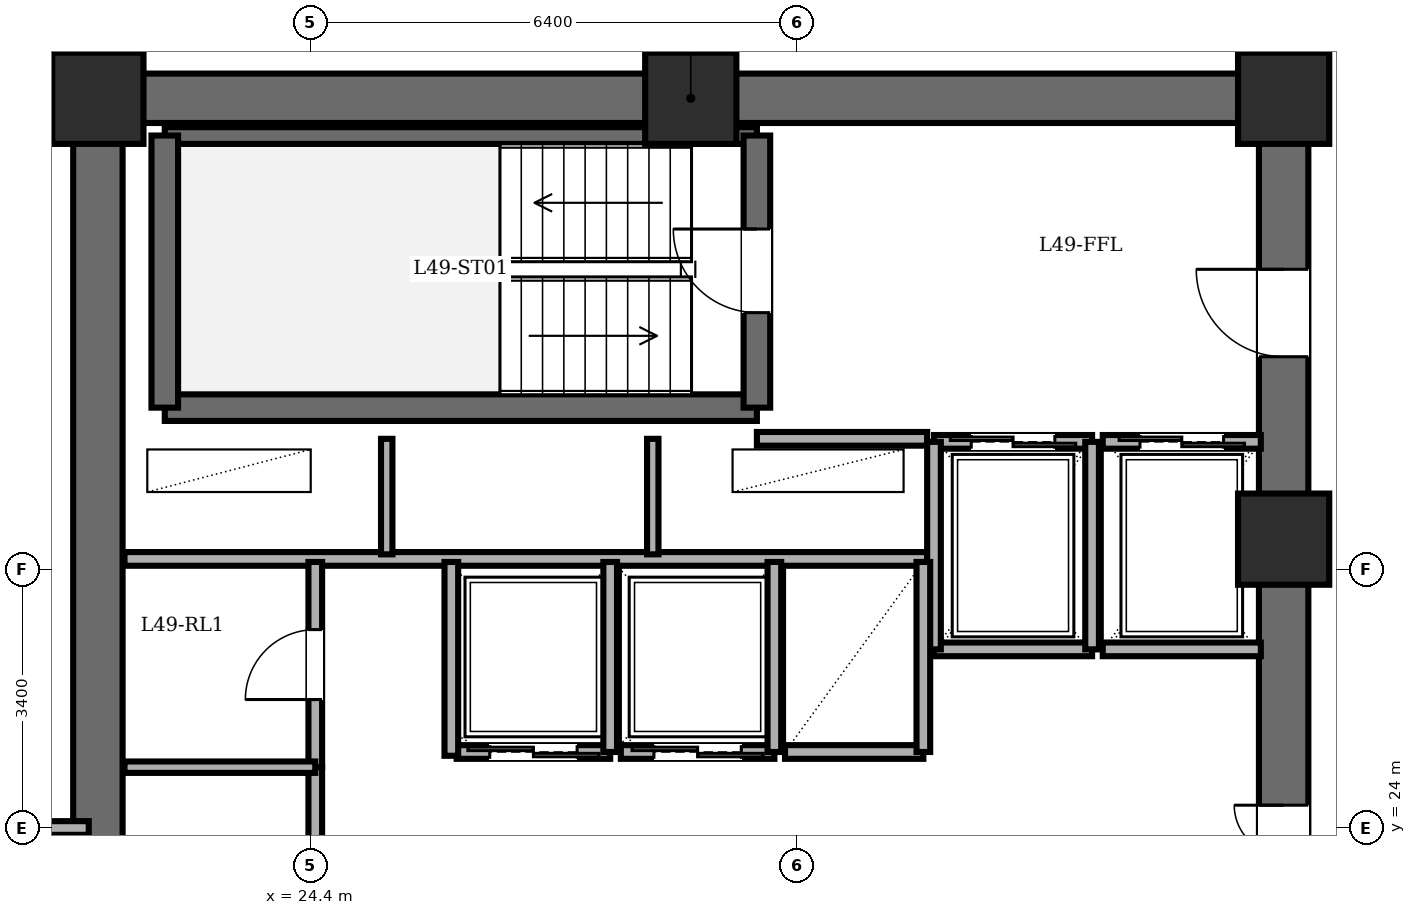
"""IFC4 building model, lengths in metres.
Left out: names, types, materials, properties, quantities, classifications, styles, units other than length and angle.
Written with IfcOpenShell. Run it as: python <this file> out.ifc"""

import sys

from ifc_helpers import new_model, si_unit, direction, frame, frame_2d, origin, origin_2d, place, context, subcontext, project, spatial, rectangle, extrude, element, fill, save


model = new_model("IFC4")
c1 = context("Model", 3, precision=1e-05, world=origin(), true_north=direction((0.0, 1.0)))
c2 = subcontext(c1, "Body", "Model", "MODEL_VIEW")
j1 = project(units=[si_unit("LENGTHUNIT", "METRE"), si_unit("PLANEANGLEUNIT", "RADIAN")], contexts=[c1])
p1 = place(None, origin())
s1 = spatial("IfcSite", under=j1, at=p1, CompositionType="ELEMENT")
p2 = place(p1, origin())
s2 = spatial("IfcBuilding", under=s1, at=p2, CompositionType="ELEMENT")
p3 = place(p2, frame((0.0, 0.0, 187.0)))
s3 = spatial("IfcBuildingStorey", under=s2, at=p3, CompositionType="ELEMENT", Elevation=187.0)
for number, where, z_axis, x_axis in (
    (1, (37.2, 27.8, 0.0), (0.0, 0.0, 1.0), (1.0, 0.0, 0.0)),
    (2, (37.2, 33.6, 0.0), (0.0, 0.0, 1.0), (1.0, 0.0, 0.0)),
    (3, (29.4, 33.6, 0.0), (0.0, 0.0, 1.0), (1.0, 0.0, 0.0)),
    (4, (21.6, 33.6, 0.0), (0.0, 0.0, 1.0), (1.0, 0.0, 0.0)),
):
    element("IfcColumn", number, at=place(p3, frame(where, z_axis=z_axis, x_axis=x_axis)), inside=s3, PredefinedType="COLUMN", context=c2, shape_type="SweptSolid", body=[
        extrude(rectangle(XDim=1.2, YDim=1.2, at=origin_2d()), origin(), (0.0, 0.0, 1.0), 3.6),
    ])
p4 = place(p3, frame((21.6, 14.4, 0.0), z_axis=(0.0, 0.0, 1.0), x_axis=(0.0, 1.0, 0.0)))
e5 = element("IfcWall", 5, at=p4, inside=s3, PredefinedType="SHEAR", context=c2, shape_type="SweptSolid", body=[
    extrude(rectangle(XDim=19.2, YDim=0.65, at=frame_2d((9.6, 0.0))), origin(), (0.0, 0.0, 1.0), 3.36),
])
p5 = place(p3, frame((21.6, 33.6, 0.0), z_axis=(0.0, 0.0, 1.0), x_axis=(1.0, 0.0, 0.0)))
e6 = element("IfcWall", 6, at=p5, inside=s3, PredefinedType="SHEAR", context=c2, shape_type="SweptSolid", body=[
    extrude(rectangle(XDim=15.6, YDim=0.65, at=frame_2d((7.8, 0.0))), origin(), (0.0, 0.0, 1.0), 3.36),
])
p6 = place(p3, frame((37.2, 14.4, 0.0), z_axis=(0.0, 0.0, 1.0), x_axis=(0.0, 1.0, 0.0)))
e7 = element("IfcWall", 7, at=p6, inside=s3, PredefinedType="SHEAR", context=c2, shape_type="SweptSolid", body=[
    extrude(rectangle(XDim=19.2, YDim=0.65, at=frame_2d((9.6, 0.0))), origin(), (0.0, 0.0, 1.0), 3.36),
])
p7 = place(p6, frame((15.8, 0.0, 0.0)))
e8 = element("IfcOpeningElement", 8, at=p7, cuts=e7, PredefinedType="OPENING", context=c2, shape_type="SweptSolid", body=[
    extrude(rectangle(XDim=1.15, YDim=2.15, at=frame_2d((0.575, 1.075))), frame((0.0, 0.335, 0.0), z_axis=(0.0, -1.0, 0.0), x_axis=(1.0, 0.0, 0.0)), (0.0, 0.0, 1.0), 0.67),
])
p8 = place(p6, frame((3.6, 0.0, 0.0)))
e9 = element("IfcOpeningElement", 9, at=p8, cuts=e7, PredefinedType="OPENING", context=c2, shape_type="SweptSolid", body=[
    extrude(rectangle(XDim=1.1, YDim=2.15, at=frame_2d((0.55, 1.075))), frame((0.0, 0.335, 0.0), z_axis=(0.0, -1.0, 0.0), x_axis=(1.0, 0.0, 0.0)), (0.0, 0.0, 1.0), 0.67),
])
p9 = place(p6, frame((8.6, 0.0, 0.0)))
e10 = element("IfcOpeningElement", 10, at=p9, cuts=e7, PredefinedType="OPENING", context=c2, shape_type="SweptSolid", body=[
    extrude(rectangle(XDim=1.3, YDim=2.2, at=frame_2d((0.65, 1.1))), frame((0.0, 0.335, 0.0), z_axis=(0.0, -1.0, 0.0), x_axis=(1.0, 0.0, 0.0)), (0.0, 0.0, 1.0), 0.67),
])
p10 = place(p3, frame((22.48, 29.53, 0.0), z_axis=(0.0, 0.0, 1.0), x_axis=(1.0, 0.0, 0.0)))
e11 = element("IfcWall", 11, at=p10, inside=s3, PredefinedType="SOLIDWALL", context=c2, shape_type="SweptSolid", body=[
    extrude(rectangle(XDim=7.79, YDim=0.35, at=frame_2d((3.895, 0.0))), origin(), (0.0, 0.0, 1.0), 3.36),
])
p11 = place(p3, frame((22.48, 33.11, 0.0), z_axis=(0.0, 0.0, 1.0), x_axis=(1.0, 0.0, 0.0)))
e12 = element("IfcWall", 12, at=p11, inside=s3, PredefinedType="PARTITIONING", context=c2, shape_type="SweptSolid", body=[
    extrude(rectangle(XDim=7.79, YDim=0.22, at=frame_2d((3.895, 0.0))), origin(), (0.0, 0.0, 1.0), 3.36),
])
p12 = place(p3, frame((22.48, 29.53, 0.0), z_axis=(0.0, 0.0, 1.0), x_axis=(0.0, 1.0, 0.0)))
e13 = element("IfcWall", 13, at=p12, inside=s3, PredefinedType="SOLIDWALL", context=c2, shape_type="SweptSolid", body=[
    extrude(rectangle(XDim=3.58, YDim=0.35, at=frame_2d((1.79, 0.0))), origin(), (0.0, 0.0, 1.0), 3.36),
])
p13 = place(p3, frame((30.27, 29.53, 0.0), z_axis=(0.0, 0.0, 1.0), x_axis=(0.0, 1.0, 0.0)))
e14 = element("IfcWall", 14, at=p13, inside=s3, PredefinedType="SOLIDWALL", context=c2, shape_type="SweptSolid", body=[
    extrude(rectangle(XDim=3.58, YDim=0.35, at=frame_2d((1.79, 0.0))), origin(), (0.0, 0.0, 1.0), 3.36),
])
p14 = place(p13, frame((1.25, 0.0, 0.0)))
e15 = element("IfcOpeningElement", 15, at=p14, cuts=e14, PredefinedType="OPENING", context=c2, shape_type="SweptSolid", body=[
    extrude(rectangle(XDim=1.1, YDim=2.15, at=frame_2d((0.55, 1.075))), frame((0.0, 0.185, 0.0), z_axis=(0.0, -1.0, 0.0), x_axis=(1.0, 0.0, 0.0)), (0.0, 0.0, 1.0), 0.37),
])
p15 = place(p3, frame((30.27, 29.12, 0.0), z_axis=(0.0, 0.0, 1.0), x_axis=(1.0, 0.0, 0.0)))
e16 = element("IfcWall", 16, at=p15, inside=s3, PredefinedType="PARTITIONING", context=c2, shape_type="SweptSolid", body=[
    extrude(rectangle(XDim=2.24, YDim=0.18, at=frame_2d((1.12, 0.0))), origin(), (0.0, 0.0, 1.0), 3.36),
])
p16 = place(p3, frame((21.95, 27.54, 0.0), z_axis=(0.0, 0.0, 1.0), x_axis=(1.0, 0.0, 0.0)))
e17 = element("IfcWall", 17, at=p16, inside=s3, PredefinedType="PARTITIONING", context=c2, shape_type="SweptSolid", body=[
    extrude(rectangle(XDim=10.56, YDim=0.18, at=frame_2d((5.28, 0.0))), origin(), (0.0, 0.0, 1.0), 3.36),
])
for number, where, z_axis, x_axis in (
    (18, (25.4, 27.6, 0.0), (0.0, 0.0, 1.0), (0.0, 1.0, 0.0)),
    (19, (28.9, 27.6, 0.0), (0.0, 0.0, 1.0), (0.0, 1.0, 0.0)),
):
    element("IfcWall", number, at=place(p3, frame(where, z_axis=z_axis, x_axis=x_axis)), inside=s3, PredefinedType="PARTITIONING", context=c2, shape_type="SweptSolid", body=[
        extrude(rectangle(XDim=1.52, YDim=0.15, at=frame_2d((0.76, 0.0))), origin(), (0.0, 0.0, 1.0), 3.36),
    ])
p17 = place(p3, frame((32.6, 29.08, 0.0), z_axis=(0.0, 0.0, 1.0), x_axis=(1.0, 0.0, 0.0)))
e20 = element("IfcWall", 20, at=p17, inside=s3, PredefinedType="PARTITIONING", context=c2, shape_type="SweptSolid", body=[
    extrude(rectangle(XDim=2.08, YDim=0.18, at=frame_2d((1.04, 0.0))), origin(), (0.0, 0.0, 1.0), 3.36),
])
p18 = place(p17, frame((0.49, 0.0, 0.0)))
e21 = element("IfcOpeningElement", 21, at=p18, cuts=e20, PredefinedType="OPENING", context=c2, shape_type="SweptSolid", body=[
    extrude(rectangle(XDim=1.1, YDim=2.2, at=frame_2d((0.55, 1.1))), frame((0.0, 0.1, 0.0), z_axis=(0.0, -1.0, 0.0), x_axis=(1.0, 0.0, 0.0)), (0.0, 0.0, 1.0), 0.2),
])
p19 = place(p3, frame((34.68, 26.35, 0.0), z_axis=(0.0, 0.0, 1.0), x_axis=(-1.0, 0.0, 0.0)))
e22 = element("IfcWall", 22, at=p19, inside=s3, PredefinedType="PARTITIONING", context=c2, shape_type="SweptSolid", body=[
    extrude(rectangle(XDim=2.08, YDim=0.18, at=frame_2d((1.04, 0.0))), origin(), (0.0, 0.0, 1.0), 3.36),
])
for number, where, z_axis, x_axis in (
    (23, (34.68, 26.35, 0.0), (0.0, 0.0, 1.0), (0.0, 1.0, 0.0)),
    (24, (32.6, 29.08, 0.0), (0.0, 0.0, 1.0), (0.0, -1.0, 0.0)),
):
    element("IfcWall", number, at=place(p3, frame(where, z_axis=z_axis, x_axis=x_axis)), inside=s3, PredefinedType="PARTITIONING", context=c2, shape_type="SweptSolid", body=[
        extrude(rectangle(XDim=2.73, YDim=0.18, at=frame_2d((1.365, 0.0))), origin(), (0.0, 0.0, 1.0), 3.36),
    ])
p20 = place(p3, frame((34.82, 29.08, 0.0), z_axis=(0.0, 0.0, 1.0), x_axis=(1.0, 0.0, 0.0)))
e25 = element("IfcWall", 25, at=p20, inside=s3, PredefinedType="PARTITIONING", context=c2, shape_type="SweptSolid", body=[
    extrude(rectangle(XDim=2.08, YDim=0.18, at=frame_2d((1.04, 0.0))), origin(), (0.0, 0.0, 1.0), 3.36),
])
p21 = place(p20, frame((0.49, 0.0, 0.0)))
e26 = element("IfcOpeningElement", 26, at=p21, cuts=e25, PredefinedType="OPENING", context=c2, shape_type="SweptSolid", body=[
    extrude(rectangle(XDim=1.1, YDim=2.2, at=frame_2d((0.55, 1.1))), frame((0.0, 0.1, 0.0), z_axis=(0.0, -1.0, 0.0), x_axis=(1.0, 0.0, 0.0)), (0.0, 0.0, 1.0), 0.2),
])
p22 = place(p3, frame((36.9, 26.35, 0.0), z_axis=(0.0, 0.0, 1.0), x_axis=(-1.0, 0.0, 0.0)))
e27 = element("IfcWall", 27, at=p22, inside=s3, PredefinedType="PARTITIONING", context=c2, shape_type="SweptSolid", body=[
    extrude(rectangle(XDim=2.08, YDim=0.18, at=frame_2d((1.04, 0.0))), origin(), (0.0, 0.0, 1.0), 3.36),
])
p23 = place(p3, frame((28.34, 25.0, 0.0), z_axis=(0.0, 0.0, 1.0), x_axis=(-1.0, 0.0, 0.0)))
e28 = element("IfcWall", 28, at=p23, inside=s3, PredefinedType="PARTITIONING", context=c2, shape_type="SweptSolid", body=[
    extrude(rectangle(XDim=2.02, YDim=0.18, at=frame_2d((1.01, 0.0))), origin(), (0.0, 0.0, 1.0), 3.36),
])
p24 = place(p23, frame((0.435, 0.0, 0.0)))
e29 = element("IfcOpeningElement", 29, at=p24, cuts=e28, PredefinedType="OPENING", context=c2, shape_type="SweptSolid", body=[
    extrude(rectangle(XDim=1.15, YDim=2.2, at=frame_2d((0.575, 1.1))), frame((0.0, 0.1, 0.0), z_axis=(0.0, -1.0, 0.0), x_axis=(1.0, 0.0, 0.0)), (0.0, 0.0, 1.0), 0.2),
])
p25 = place(p3, frame((28.34, 25.0, 0.0), z_axis=(0.0, 0.0, 1.0), x_axis=(0.0, 1.0, 0.0)))
e30 = element("IfcWall", 30, at=p25, inside=s3, PredefinedType="PARTITIONING", context=c2, shape_type="SweptSolid", body=[
    extrude(rectangle(XDim=2.5, YDim=0.18, at=frame_2d((1.25, 0.0))), origin(), (0.0, 0.0, 1.0), 3.36),
])
p26 = place(p3, frame((30.5, 25.0, 0.0), z_axis=(0.0, 0.0, 1.0), x_axis=(-1.0, 0.0, 0.0)))
e31 = element("IfcWall", 31, at=p26, inside=s3, PredefinedType="PARTITIONING", context=c2, shape_type="SweptSolid", body=[
    extrude(rectangle(XDim=2.02, YDim=0.18, at=frame_2d((1.01, 0.0))), origin(), (0.0, 0.0, 1.0), 3.36),
])
p27 = place(p26, frame((0.435, 0.0, 0.0)))
e32 = element("IfcOpeningElement", 32, at=p27, cuts=e31, PredefinedType="OPENING", context=c2, shape_type="SweptSolid", body=[
    extrude(rectangle(XDim=1.15, YDim=2.2, at=frame_2d((0.575, 1.1))), frame((0.0, 0.1, 0.0), z_axis=(0.0, -1.0, 0.0), x_axis=(1.0, 0.0, 0.0)), (0.0, 0.0, 1.0), 0.2),
])
p28 = place(p3, frame((30.5, 25.0, 0.0), z_axis=(0.0, 0.0, 1.0), x_axis=(0.0, 1.0, 0.0)))
e33 = element("IfcWall", 33, at=p28, inside=s3, PredefinedType="PARTITIONING", context=c2, shape_type="SweptSolid", body=[
    extrude(rectangle(XDim=2.5, YDim=0.18, at=frame_2d((1.25, 0.0))), origin(), (0.0, 0.0, 1.0), 3.36),
])
p29 = place(p3, frame((32.46, 25.0, 0.0), z_axis=(0.0, 0.0, 1.0), x_axis=(-1.0, 0.0, 0.0)))
e34 = element("IfcWall", 34, at=p29, inside=s3, PredefinedType="PARTITIONING", context=c2, shape_type="SweptSolid", body=[
    extrude(rectangle(XDim=1.82, YDim=0.18, at=frame_2d((0.91, 0.0))), origin(), (0.0, 0.0, 1.0), 3.36),
])
p30 = place(p3, frame((32.46, 25.0, 0.0), z_axis=(0.0, 0.0, 1.0), x_axis=(0.0, 1.0, 0.0)))
e35 = element("IfcWall", 35, at=p30, inside=s3, PredefinedType="PARTITIONING", context=c2, shape_type="SweptSolid", body=[
    extrude(rectangle(XDim=2.5, YDim=0.18, at=frame_2d((1.25, 0.0))), origin(), (0.0, 0.0, 1.0), 3.36),
])
p31 = place(p3, frame((24.46, 24.8, 0.0), z_axis=(0.0, 0.0, 1.0), x_axis=(0.0, 1.0, 0.0)))
e36 = element("IfcWall", 36, at=p31, inside=s3, PredefinedType="PARTITIONING", context=c2, shape_type="SweptSolid", body=[
    extrude(rectangle(XDim=2.7, YDim=0.18, at=frame_2d((1.35, 0.0))), origin(), (0.0, 0.0, 1.0), 3.36),
])
p32 = place(p31, frame((0.89, 0.0, 0.0)))
e37 = element("IfcOpeningElement", 37, at=p32, cuts=e36, PredefinedType="OPENING", context=c2, shape_type="SweptSolid", body=[
    extrude(rectangle(XDim=0.92, YDim=2.1, at=frame_2d((0.46, 1.05))), frame((0.0, 0.1, 0.0), z_axis=(0.0, -1.0, 0.0), x_axis=(1.0, 0.0, 0.0)), (0.0, 0.0, 1.0), 0.2),
])
p33 = place(p3, frame((24.46, 19.8, 0.0), z_axis=(0.0, 0.0, 1.0), x_axis=(0.0, 1.0, 0.0)))
e38 = element("IfcWall", 38, at=p33, inside=s3, PredefinedType="PARTITIONING", context=c2, shape_type="SweptSolid", body=[
    extrude(rectangle(XDim=5.0, YDim=0.18, at=frame_2d((2.5, 0.0))), origin(), (0.0, 0.0, 1.0), 3.36),
])
p34 = place(p33, frame((2.04, 0.0, 0.0)))
e39 = element("IfcOpeningElement", 39, at=p34, cuts=e38, PredefinedType="OPENING", context=c2, shape_type="SweptSolid", body=[
    extrude(rectangle(XDim=0.92, YDim=2.1, at=frame_2d((0.46, 1.05))), frame((0.0, 0.1, 0.0), z_axis=(0.0, -1.0, 0.0), x_axis=(1.0, 0.0, 0.0)), (0.0, 0.0, 1.0), 0.2),
])
p35 = place(p3, frame((21.95, 24.8, 0.0), z_axis=(0.0, 0.0, 1.0), x_axis=(1.0, 0.0, 0.0)))
e40 = element("IfcWall", 40, at=p35, inside=s3, PredefinedType="PARTITIONING", context=c2, shape_type="SweptSolid", body=[
    extrude(rectangle(XDim=2.51, YDim=0.15, at=frame_2d((1.255, 0.0))), origin(), (0.0, 0.0, 1.0), 3.36),
])
p36 = place(p3, frame((26.25, 24.95, 0.0), z_axis=(0.0, 0.0, 1.0), x_axis=(0.0, 1.0, 0.0)))
e41 = element("IfcWall", 41, at=p36, inside=s3, PredefinedType="PARTITIONING", context=c2, shape_type="SweptSolid", body=[
    extrude(rectangle(XDim=2.55, YDim=0.18, at=frame_2d((1.275, 0.0))), origin(), (0.0, 0.0, 1.0), 3.36),
])
p37 = place(p3, frame((13.8, 24.0, 0.0), z_axis=(0.0, 0.0, 1.0), x_axis=(1.0, 0.0, 0.0)))
e42 = element("IfcWall", 42, at=p37, inside=s3, PredefinedType="PARTITIONING", context=c2, shape_type="SweptSolid", body=[
    extrude(rectangle(XDim=7.68, YDim=0.18, at=frame_2d((3.84, 0.0))), origin(), (0.0, 0.0, 1.0), 3.36),
])
p38 = place(p3, frame((13.8, 33.82, 0.0), z_axis=(0.0, 0.0, 1.0), x_axis=(1.0, 0.0, 0.0)))
e43 = element("IfcWall", 43, at=p38, inside=s3, PredefinedType="PARTITIONING", context=c2, shape_type="SweptSolid", body=[
    extrude(rectangle(XDim=7.68, YDim=0.18, at=frame_2d((3.84, 0.0))), origin(), (0.0, 0.0, 1.0), 3.36),
])
p39 = place(p38, frame((3.68, 0.0, 0.0)))
e44 = element("IfcOpeningElement", 44, at=p39, cuts=e43, PredefinedType="OPENING", context=c2, shape_type="SweptSolid", body=[
    extrude(rectangle(XDim=1.0, YDim=2.15, at=frame_2d((0.5, 1.075))), frame((0.0, 0.1, 0.0), z_axis=(0.0, -1.0, 0.0), x_axis=(1.0, 0.0, 0.0)), (0.0, 0.0, 1.0), 0.2),
])
p40 = place(p14, origin())
e45 = element("IfcDoor", 45, at=p40, inside=s3, OperationType="SINGLE_SWING_RIGHT", PredefinedType="DOOR", context=c2, shape_type="SweptSolid", body=[
    extrude(rectangle(XDim=1.1, YDim=2.15, at=frame_2d((0.55, 1.075))), frame((0.0, 0.025, 0.0), z_axis=(0.0, -1.0, 0.0), x_axis=(1.0, 0.0, 0.0)), (0.0, 0.0, 1.0), 0.05),
])
fill(e15, e45)
p41 = place(p7, origin())
e46 = element("IfcDoor", 46, at=p41, inside=s3, OperationType="SINGLE_SWING_RIGHT", PredefinedType="DOOR", context=c2, shape_type="SweptSolid", body=[
    extrude(rectangle(XDim=1.15, YDim=2.15, at=frame_2d((0.575, 1.075))), frame((0.0, 0.025, 0.0), z_axis=(0.0, -1.0, 0.0), x_axis=(1.0, 0.0, 0.0)), (0.0, 0.0, 1.0), 0.05),
])
fill(e8, e46)
p42 = place(p18, origin())
e47 = element("IfcDoor", 47, at=p42, inside=s3, OperationType="DOUBLE_DOOR_SLIDING", PredefinedType="DOOR", context=c2, shape_type="SweptSolid", body=[
    extrude(rectangle(XDim=1.1, YDim=2.2, at=frame_2d((0.55, 1.1))), frame((0.0, 0.025, 0.0), z_axis=(0.0, -1.0, 0.0), x_axis=(1.0, 0.0, 0.0)), (0.0, 0.0, 1.0), 0.05),
])
fill(e21, e47)
p43 = place(p21, origin())
e48 = element("IfcDoor", 48, at=p43, inside=s3, OperationType="DOUBLE_DOOR_SLIDING", PredefinedType="DOOR", context=c2, shape_type="SweptSolid", body=[
    extrude(rectangle(XDim=1.1, YDim=2.2, at=frame_2d((0.55, 1.1))), frame((0.0, 0.025, 0.0), z_axis=(0.0, -1.0, 0.0), x_axis=(1.0, 0.0, 0.0)), (0.0, 0.0, 1.0), 0.05),
])
fill(e26, e48)
p44 = place(p24, origin())
e49 = element("IfcDoor", 49, at=p44, inside=s3, OperationType="DOUBLE_DOOR_SLIDING", PredefinedType="DOOR", context=c2, shape_type="SweptSolid", body=[
    extrude(rectangle(XDim=1.15, YDim=2.2, at=frame_2d((0.575, 1.1))), frame((0.0, 0.025, 0.0), z_axis=(0.0, -1.0, 0.0), x_axis=(1.0, 0.0, 0.0)), (0.0, 0.0, 1.0), 0.05),
])
fill(e29, e49)
p45 = place(p27, origin())
e50 = element("IfcDoor", 50, at=p45, inside=s3, OperationType="DOUBLE_DOOR_SLIDING", PredefinedType="DOOR", context=c2, shape_type="SweptSolid", body=[
    extrude(rectangle(XDim=1.15, YDim=2.2, at=frame_2d((0.575, 1.1))), frame((0.0, 0.025, 0.0), z_axis=(0.0, -1.0, 0.0), x_axis=(1.0, 0.0, 0.0)), (0.0, 0.0, 1.0), 0.05),
])
fill(e32, e50)
p46 = place(p32, origin())
e51 = element("IfcDoor", 51, at=p46, inside=s3, OperationType="SINGLE_SWING_LEFT", PredefinedType="DOOR", context=c2, shape_type="SweptSolid", body=[
    extrude(rectangle(XDim=0.92, YDim=2.1, at=frame_2d((0.46, 1.05))), frame((0.0, 0.025, 0.0), z_axis=(0.0, -1.0, 0.0), x_axis=(1.0, 0.0, 0.0)), (0.0, 0.0, 1.0), 0.05),
])
fill(e37, e51)
p47 = place(p9, origin())
e52 = element("IfcDoor", 52, at=p47, inside=s3, OperationType="DOUBLE_DOOR_SINGLE_SWING", PredefinedType="DOOR", context=c2, shape_type="SweptSolid", body=[
    extrude(rectangle(XDim=1.3, YDim=2.2, at=frame_2d((0.65, 1.1))), frame((0.0, 0.025, 0.0), z_axis=(0.0, -1.0, 0.0), x_axis=(1.0, 0.0, 0.0)), (0.0, 0.0, 1.0), 0.05),
])
fill(e10, e52)
save(model, sys.argv[1])
